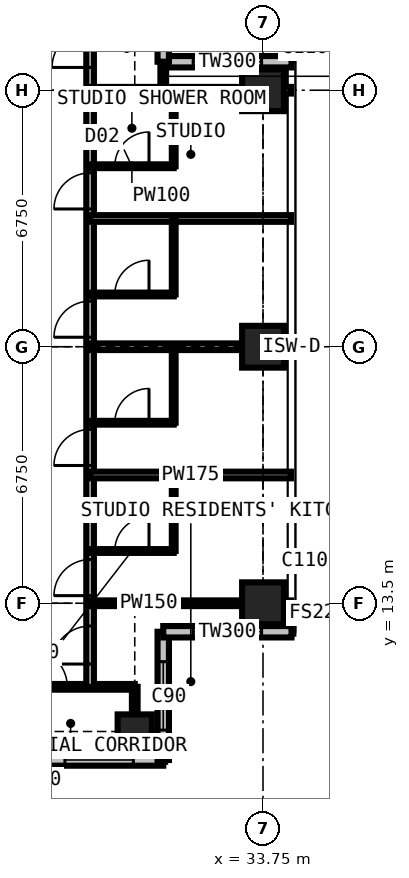
"""IFC4 building model, lengths in metres.
Left out: names, types, materials, properties, quantities, classifications, styles, units other than length and angle.
Written with IfcOpenShell. Run it as: python <this file> out.ifc"""

import sys

from ifc_helpers import new_model, si_unit, direction, frame, frame_2d, origin, origin_2d, place, context, subcontext, project, spatial, rectangle, extrude, element, fill, save


model = new_model("IFC4")
c1 = context("Model", 3, precision=1e-05, world=origin(), true_north=direction((0.0, 1.0)))
c2 = subcontext(c1, "Body", "Model", "MODEL_VIEW")
j1 = project(units=[si_unit("LENGTHUNIT", "METRE"), si_unit("PLANEANGLEUNIT", "RADIAN")], contexts=[c1])
p1 = place(None, origin())
s1 = spatial("IfcSite", under=j1, at=p1, CompositionType="ELEMENT")
p2 = place(p1, origin())
s2 = spatial("IfcBuilding", under=s1, at=p2, CompositionType="ELEMENT")
p3 = place(p2, frame((0.0, 0.0, 218.7)))
s3 = spatial("IfcBuildingStorey", under=s2, at=p3, CompositionType="ELEMENT", Elevation=218.7)
p4 = place(p3, frame((30.375, 10.125, 0.0), z_axis=(0.0, 0.0, 1.0), x_axis=(1.0, 0.0, 0.0)))
e1 = element("IfcColumn", 1, at=p4, inside=s3, PredefinedType="COLUMN", context=c2, shape_type="SweptSolid", body=[
    extrude(rectangle(XDim=0.9, YDim=0.9, at=origin_2d()), origin(), (0.0, 0.0, 1.0), 3.6),
])
for number, where, z_axis, x_axis in (
    (2, (33.75, 13.5, 0.0), (0.0, 0.0, 1.0), (1.0, 0.0, 0.0)),
    (3, (33.75, 20.25, 0.0), (0.0, 0.0, 1.0), (1.0, 0.0, 0.0)),
    (4, (33.75, 27.0, 0.0), (0.0, 0.0, 1.0), (1.0, 0.0, 0.0)),
):
    element("IfcColumn", number, at=place(p3, frame(where, z_axis=z_axis, x_axis=x_axis)), inside=s3, PredefinedType="COLUMN", context=c2, shape_type="SweptSolid", body=[
        extrude(rectangle(XDim=1.1, YDim=1.1, at=origin_2d()), origin(), (0.0, 0.0, 1.0), 3.6),
    ])
p5 = place(p3, frame((34.5, 27.75, 0.0), z_axis=(0.0, 0.0, 1.0), x_axis=(-1.0, 0.0, 0.0)))
e5 = element("IfcWall", 5, at=p5, inside=s3, PredefinedType="SOLIDWALL", context=c2, shape_type="SweptSolid", body=[
    extrude(rectangle(XDim=3.375, YDim=0.3, at=frame_2d((1.688, 0.0))), origin(), (0.0, 0.0, 1.0), 3.375),
])
p6 = place(p5, frame((0.788, 0.0, 0.6)))
e6 = element("IfcOpeningElement", 6, at=p6, cuts=e5, PredefinedType="OPENING", context=c2, shape_type="SweptSolid", body=[
    extrude(rectangle(XDim=1.8, YDim=2.1, at=frame_2d((0.9, 1.05))), frame((0.0, 0.16, 0.0), z_axis=(0.0, -1.0, 0.0), x_axis=(1.0, 0.0, 0.0)), (0.0, 0.0, 1.0), 0.32),
])
p7 = place(p3, frame((31.125, 27.75, 0.0), z_axis=(0.0, 0.0, 1.0), x_axis=(0.0, 1.0, 0.0)))
e7 = element("IfcWall", 7, at=p7, inside=s3, PredefinedType="SOLIDWALL", context=c2, shape_type="SweptSolid", body=[
    extrude(rectangle(XDim=3.375, YDim=0.3, at=frame_2d((1.688, 0.0))), origin(), (0.0, 0.0, 1.0), 3.375),
])
p8 = place(p7, frame((1.663, 0.0, 0.9)))
e8 = element("IfcOpeningElement", 8, at=p8, cuts=e7, PredefinedType="OPENING", context=c2, shape_type="SweptSolid", body=[
    extrude(rectangle(XDim=1.5, YDim=1.8, at=frame_2d((0.75, 0.9))), frame((0.0, 0.16, 0.0), z_axis=(0.0, -1.0, 0.0), x_axis=(1.0, 0.0, 0.0)), (0.0, 0.0, 1.0), 0.32),
])
p9 = place(p3, frame((27.75, 9.375, 0.0), z_axis=(0.0, 0.0, 1.0), x_axis=(1.0, 0.0, 0.0)))
e9 = element("IfcWall", 9, at=p9, inside=s3, PredefinedType="SOLIDWALL", context=c2, shape_type="SweptSolid", body=[
    extrude(rectangle(XDim=3.375, YDim=0.3, at=frame_2d((1.688, 0.0))), origin(), (0.0, 0.0, 1.0), 3.375),
])
p10 = place(p9, frame((0.788, 0.0, 0.6)))
e10 = element("IfcOpeningElement", 10, at=p10, cuts=e9, PredefinedType="OPENING", context=c2, shape_type="SweptSolid", body=[
    extrude(rectangle(XDim=1.8, YDim=2.1, at=frame_2d((0.9, 1.05))), frame((0.0, 0.16, 0.0), z_axis=(0.0, -1.0, 0.0), x_axis=(1.0, 0.0, 0.0)), (0.0, 0.0, 1.0), 0.32),
])
p11 = place(p3, frame((31.125, 9.375, 0.0), z_axis=(0.0, 0.0, 1.0), x_axis=(0.0, 1.0, 0.0)))
e11 = element("IfcWall", 11, at=p11, inside=s3, PredefinedType="SOLIDWALL", context=c2, shape_type="SweptSolid", body=[
    extrude(rectangle(XDim=3.375, YDim=0.3, at=frame_2d((1.688, 0.0))), origin(), (0.0, 0.0, 1.0), 3.375),
])
p12 = place(p11, frame((0.788, 0.0, 0.6)))
e12 = element("IfcOpeningElement", 12, at=p12, cuts=e11, PredefinedType="OPENING", context=c2, shape_type="SweptSolid", body=[
    extrude(rectangle(XDim=1.8, YDim=2.1, at=frame_2d((0.9, 1.05))), frame((0.0, 0.16, 0.0), z_axis=(0.0, -1.0, 0.0), x_axis=(1.0, 0.0, 0.0)), (0.0, 0.0, 1.0), 0.32),
])
p13 = place(p3, frame((31.125, 12.75, 0.0), z_axis=(0.0, 0.0, 1.0), x_axis=(1.0, 0.0, 0.0)))
e13 = element("IfcWall", 13, at=p13, inside=s3, PredefinedType="SOLIDWALL", context=c2, shape_type="SweptSolid", body=[
    extrude(rectangle(XDim=3.375, YDim=0.3, at=frame_2d((1.688, 0.0))), origin(), (0.0, 0.0, 1.0), 3.375),
])
p14 = place(p13, frame((0.788, 0.0, 0.6)))
e14 = element("IfcOpeningElement", 14, at=p14, cuts=e13, PredefinedType="OPENING", context=c2, shape_type="SweptSolid", body=[
    extrude(rectangle(XDim=1.8, YDim=2.1, at=frame_2d((0.9, 1.05))), frame((0.0, 0.16, 0.0), z_axis=(0.0, -1.0, 0.0), x_axis=(1.0, 0.0, 0.0)), (0.0, 0.0, 1.0), 0.32),
])
p15 = place(p3, frame((10.125, 11.3, 0.0), z_axis=(0.0, 0.0, 1.0), x_axis=(1.0, 0.0, 0.0)))
e15 = element("IfcWall", 15, at=p15, inside=s3, PredefinedType="PARTITIONING", context=c2, shape_type="SweptSolid", body=[
    extrude(rectangle(XDim=20.25, YDim=0.15, at=frame_2d((10.125, 0.0))), origin(), (0.0, 0.0, 1.0), 3.375),
])
p16 = place(p15, frame((6.95, 0.0, 0.0)))
e16 = element("IfcOpeningElement", 16, at=p16, cuts=e15, PredefinedType="OPENING", context=c2, shape_type="SweptSolid", body=[
    extrude(rectangle(XDim=0.95, YDim=2.2, at=frame_2d((0.475, 1.1))), frame((0.0, 0.085, 0.0), z_axis=(0.0, -1.0, 0.0), x_axis=(1.0, 0.0, 0.0)), (0.0, 0.0, 1.0), 0.17),
])
p17 = place(p15, frame((10.375, 0.0, 0.0)))
e17 = element("IfcOpeningElement", 17, at=p17, cuts=e15, PredefinedType="OPENING", context=c2, shape_type="SweptSolid", body=[
    extrude(rectangle(XDim=0.95, YDim=2.2, at=frame_2d((0.475, 1.1))), frame((0.0, 0.085, 0.0), z_axis=(0.0, -1.0, 0.0), x_axis=(1.0, 0.0, 0.0)), (0.0, 0.0, 1.0), 0.17),
])
p18 = place(p15, frame((13.75, 0.0, 0.0)))
e18 = element("IfcOpeningElement", 18, at=p18, cuts=e15, PredefinedType="OPENING", context=c2, shape_type="SweptSolid", body=[
    extrude(rectangle(XDim=0.95, YDim=2.2, at=frame_2d((0.475, 1.1))), frame((0.0, 0.085, 0.0), z_axis=(0.0, -1.0, 0.0), x_axis=(1.0, 0.0, 0.0)), (0.0, 0.0, 1.0), 0.17),
])
p19 = place(p15, frame((17.475, 0.0, 0.0)))
e19 = element("IfcOpeningElement", 19, at=p19, cuts=e15, PredefinedType="OPENING", context=c2, shape_type="SweptSolid", body=[
    extrude(rectangle(XDim=1.0, YDim=2.2, at=frame_2d((0.5, 1.1))), frame((0.0, 0.085, 0.0), z_axis=(0.0, -1.0, 0.0), x_axis=(1.0, 0.0, 0.0)), (0.0, 0.0, 1.0), 0.17),
])
p20 = place(p3, frame((29.2, 11.3, 0.0), z_axis=(0.0, 0.0, 1.0), x_axis=(0.0, 1.0, 0.0)))
e20 = element("IfcWall", 20, at=p20, inside=s3, PredefinedType="PARTITIONING", context=c2, shape_type="SweptSolid", body=[
    extrude(rectangle(XDim=17.9, YDim=0.2, at=frame_2d((8.95, 0.0))), origin(), (0.0, 0.0, 1.0), 3.375),
])
p21 = place(p20, frame((0.6, 0.0, 0.0)))
e21 = element("IfcOpeningElement", 21, at=p21, cuts=e20, PredefinedType="OPENING", context=c2, shape_type="SweptSolid", body=[
    extrude(rectangle(XDim=1.0, YDim=2.2, at=frame_2d((0.5, 1.1))), frame((0.0, 0.11, 0.0), z_axis=(0.0, -1.0, 0.0), x_axis=(1.0, 0.0, 0.0)), (0.0, 0.0, 1.0), 0.22),
])
p22 = place(p20, frame((2.4, 0.0, 0.0)))
e22 = element("IfcOpeningElement", 22, at=p22, cuts=e20, PredefinedType="OPENING", context=c2, shape_type="SweptSolid", body=[
    extrude(rectangle(XDim=0.95, YDim=2.2, at=frame_2d((0.475, 1.1))), frame((0.0, 0.11, 0.0), z_axis=(0.0, -1.0, 0.0), x_axis=(1.0, 0.0, 0.0)), (0.0, 0.0, 1.0), 0.22),
])
p23 = place(p20, frame((5.825, 0.0, 0.0)))
e23 = element("IfcOpeningElement", 23, at=p23, cuts=e20, PredefinedType="OPENING", context=c2, shape_type="SweptSolid", body=[
    extrude(rectangle(XDim=0.95, YDim=2.2, at=frame_2d((0.475, 1.1))), frame((0.0, 0.11, 0.0), z_axis=(0.0, -1.0, 0.0), x_axis=(1.0, 0.0, 0.0)), (0.0, 0.0, 1.0), 0.22),
])
p24 = place(p20, frame((9.2, 0.0, 0.0)))
e24 = element("IfcOpeningElement", 24, at=p24, cuts=e20, PredefinedType="OPENING", context=c2, shape_type="SweptSolid", body=[
    extrude(rectangle(XDim=0.95, YDim=2.2, at=frame_2d((0.475, 1.1))), frame((0.0, 0.11, 0.0), z_axis=(0.0, -1.0, 0.0), x_axis=(1.0, 0.0, 0.0)), (0.0, 0.0, 1.0), 0.22),
])
p25 = place(p20, frame((12.575, 0.0, 0.0)))
e25 = element("IfcOpeningElement", 25, at=p25, cuts=e20, PredefinedType="OPENING", context=c2, shape_type="SweptSolid", body=[
    extrude(rectangle(XDim=0.95, YDim=2.2, at=frame_2d((0.475, 1.1))), frame((0.0, 0.11, 0.0), z_axis=(0.0, -1.0, 0.0), x_axis=(1.0, 0.0, 0.0)), (0.0, 0.0, 1.0), 0.22),
])
p26 = place(p20, frame((16.3, 0.0, 0.0)))
e26 = element("IfcOpeningElement", 26, at=p26, cuts=e20, PredefinedType="OPENING", context=c2, shape_type="SweptSolid", body=[
    extrude(rectangle(XDim=1.0, YDim=2.2, at=frame_2d((0.5, 1.1))), frame((0.0, 0.11, 0.0), z_axis=(0.0, -1.0, 0.0), x_axis=(1.0, 0.0, 0.0)), (0.0, 0.0, 1.0), 0.22),
])
p27 = place(p3, frame((29.2, 13.5, 0.0), z_axis=(0.0, 0.0, 1.0), x_axis=(1.0, 0.0, 0.0)))
e27 = element("IfcWall", 27, at=p27, inside=s3, PredefinedType="PARTITIONING", context=c2, shape_type="SweptSolid", body=[
    extrude(rectangle(XDim=5.284, YDim=0.15, at=frame_2d((2.642, 0.0))), origin(), (0.0, 0.0, 1.0), 2.877),
])
p28 = place(p3, frame((29.2, 14.875, 0.0), z_axis=(0.0, 0.0, 1.0), x_axis=(1.0, 0.0, 0.0)))
e28 = element("IfcWall", 28, at=p28, inside=s3, PredefinedType="PARTITIONING", context=c2, shape_type="SweptSolid", body=[
    extrude(rectangle(XDim=2.2, YDim=0.1, at=frame_2d((1.1, 0.0))), origin(), (0.0, 0.0, 1.0), 3.375),
])
p29 = place(p28, frame((0.65, 0.0, 0.0)))
e29 = element("IfcOpeningElement", 29, at=p29, cuts=e28, PredefinedType="OPENING", context=c2, shape_type="SweptSolid", body=[
    extrude(rectangle(XDim=0.9, YDim=2.2, at=frame_2d((0.45, 1.1))), frame((0.0, 0.06, 0.0), z_axis=(0.0, -1.0, 0.0), x_axis=(1.0, 0.0, 0.0)), (0.0, 0.0, 1.0), 0.12),
])
p30 = place(p3, frame((29.2, 16.875, 0.0), z_axis=(0.0, 0.0, 1.0), x_axis=(1.0, 0.0, 0.0)))
e30 = element("IfcWall", 30, at=p30, inside=s3, PredefinedType="PARTITIONING", context=c2, shape_type="SweptSolid", body=[
    extrude(rectangle(XDim=5.284, YDim=0.175, at=frame_2d((2.642, 0.0))), origin(), (0.0, 0.0, 1.0), 3.375),
])
p31 = place(p3, frame((29.2, 18.25, 0.0), z_axis=(0.0, 0.0, 1.0), x_axis=(1.0, 0.0, 0.0)))
e31 = element("IfcWall", 31, at=p31, inside=s3, PredefinedType="PARTITIONING", context=c2, shape_type="SweptSolid", body=[
    extrude(rectangle(XDim=2.2, YDim=0.1, at=frame_2d((1.1, 0.0))), origin(), (0.0, 0.0, 1.0), 3.375),
])
p32 = place(p31, frame((0.65, 0.0, 0.0)))
e32 = element("IfcOpeningElement", 32, at=p32, cuts=e31, PredefinedType="OPENING", context=c2, shape_type="SweptSolid", body=[
    extrude(rectangle(XDim=0.9, YDim=2.2, at=frame_2d((0.45, 1.1))), frame((0.0, 0.06, 0.0), z_axis=(0.0, -1.0, 0.0), x_axis=(1.0, 0.0, 0.0)), (0.0, 0.0, 1.0), 0.12),
])
p33 = place(p3, frame((29.2, 20.25, 0.0), z_axis=(0.0, 0.0, 1.0), x_axis=(1.0, 0.0, 0.0)))
e33 = element("IfcWall", 33, at=p33, inside=s3, PredefinedType="PARTITIONING", context=c2, shape_type="SweptSolid", body=[
    extrude(rectangle(XDim=5.284, YDim=0.175, at=frame_2d((2.642, 0.0))), origin(), (0.0, 0.0, 1.0), 2.877),
])
p34 = place(p3, frame((29.2, 21.625, 0.0), z_axis=(0.0, 0.0, 1.0), x_axis=(1.0, 0.0, 0.0)))
e34 = element("IfcWall", 34, at=p34, inside=s3, PredefinedType="PARTITIONING", context=c2, shape_type="SweptSolid", body=[
    extrude(rectangle(XDim=2.2, YDim=0.1, at=frame_2d((1.1, 0.0))), origin(), (0.0, 0.0, 1.0), 3.375),
])
p35 = place(p34, frame((0.65, 0.0, 0.0)))
e35 = element("IfcOpeningElement", 35, at=p35, cuts=e34, PredefinedType="OPENING", context=c2, shape_type="SweptSolid", body=[
    extrude(rectangle(XDim=0.9, YDim=2.2, at=frame_2d((0.45, 1.1))), frame((0.0, 0.06, 0.0), z_axis=(0.0, -1.0, 0.0), x_axis=(1.0, 0.0, 0.0)), (0.0, 0.0, 1.0), 0.12),
])
p36 = place(p3, frame((29.2, 23.625, 0.0), z_axis=(0.0, 0.0, 1.0), x_axis=(1.0, 0.0, 0.0)))
e36 = element("IfcWall", 36, at=p36, inside=s3, PredefinedType="PARTITIONING", context=c2, shape_type="SweptSolid", body=[
    extrude(rectangle(XDim=5.284, YDim=0.175, at=frame_2d((2.642, 0.0))), origin(), (0.0, 0.0, 1.0), 3.375),
])
p37 = place(p3, frame((29.2, 25.0, 0.0), z_axis=(0.0, 0.0, 1.0), x_axis=(1.0, 0.0, 0.0)))
e37 = element("IfcWall", 37, at=p37, inside=s3, PredefinedType="PARTITIONING", context=c2, shape_type="SweptSolid", body=[
    extrude(rectangle(XDim=2.2, YDim=0.1, at=frame_2d((1.1, 0.0))), origin(), (0.0, 0.0, 1.0), 3.375),
])
p38 = place(p37, frame((0.65, 0.0, 0.0)))
e38 = element("IfcOpeningElement", 38, at=p38, cuts=e37, PredefinedType="OPENING", context=c2, shape_type="SweptSolid", body=[
    extrude(rectangle(XDim=0.9, YDim=2.2, at=frame_2d((0.45, 1.1))), frame((0.0, 0.06, 0.0), z_axis=(0.0, -1.0, 0.0), x_axis=(1.0, 0.0, 0.0)), (0.0, 0.0, 1.0), 0.12),
])
p39 = place(p3, frame((29.2, 27.0, 0.0), z_axis=(0.0, 0.0, 1.0), x_axis=(1.0, 0.0, 0.0)))
e39 = element("IfcWall", 39, at=p39, inside=s3, PredefinedType="PARTITIONING", context=c2, shape_type="SweptSolid", body=[
    extrude(rectangle(XDim=5.284, YDim=0.175, at=frame_2d((2.642, 0.0))), origin(), (0.0, 0.0, 1.0), 2.877),
])
p40 = place(p3, frame((30.375, 9.525, 0.0), z_axis=(0.0, 0.0, 1.0), x_axis=(0.0, 1.0, 0.0)))
e40 = element("IfcWall", 40, at=p40, inside=s3, PredefinedType="PARTITIONING", context=c2, shape_type="SweptSolid", body=[
    extrude(rectangle(XDim=1.775, YDim=0.15, at=frame_2d((0.888, 0.0))), origin(), (0.0, 0.0, 1.0), 2.877),
])
p41 = place(p3, frame((31.125, 27.0, 0.0), z_axis=(0.0, 0.0, 1.0), x_axis=(0.0, 1.0, 0.0)))
e41 = element("IfcWall", 41, at=p41, inside=s3, PredefinedType="PARTITIONING", context=c2, shape_type="SweptSolid", body=[
    extrude(rectangle(XDim=0.734, YDim=0.15, at=frame_2d((0.367, 0.0))), origin(), (0.0, 0.0, 1.0), 3.375),
])
for number, where, z_axis, x_axis in (
    (42, (31.4, 14.875, 0.0), (0.0, 0.0, 1.0), (0.0, 1.0, 0.0)),
    (43, (31.4, 18.25, 0.0), (0.0, 0.0, 1.0), (0.0, 1.0, 0.0)),
    (44, (31.4, 21.625, 0.0), (0.0, 0.0, 1.0), (0.0, 1.0, 0.0)),
    (45, (31.4, 25.0, 0.0), (0.0, 0.0, 1.0), (0.0, 1.0, 0.0)),
):
    element("IfcWall", number, at=place(p3, frame(where, z_axis=z_axis, x_axis=x_axis)), inside=s3, PredefinedType="PARTITIONING", context=c2, shape_type="SweptSolid", body=[
        extrude(rectangle(XDim=2.0, YDim=0.1, at=frame_2d((1.0, 0.0))), origin(), (0.0, 0.0, 1.0), 3.375),
    ])
p42 = place(p6, origin())
e46 = element("IfcWindow", 46, at=p42, inside=s3, PartitioningType="SINGLE_PANEL", PredefinedType="WINDOW", context=c2, shape_type="SweptSolid", body=[
    extrude(rectangle(XDim=1.8, YDim=2.1, at=frame_2d((0.9, 1.05))), frame((0.0, 0.03, 0.0), z_axis=(0.0, -1.0, 0.0), x_axis=(1.0, 0.0, 0.0)), (0.0, 0.0, 1.0), 0.06),
])
fill(e6, e46)
p43 = place(p10, origin())
e47 = element("IfcWindow", 47, at=p43, inside=s3, PartitioningType="SINGLE_PANEL", PredefinedType="WINDOW", context=c2, shape_type="SweptSolid", body=[
    extrude(rectangle(XDim=1.8, YDim=2.1, at=frame_2d((0.9, 1.05))), frame((0.0, 0.03, 0.0), z_axis=(0.0, -1.0, 0.0), x_axis=(1.0, 0.0, 0.0)), (0.0, 0.0, 1.0), 0.06),
])
fill(e10, e47)
p44 = place(p12, origin())
e48 = element("IfcWindow", 48, at=p44, inside=s3, PartitioningType="SINGLE_PANEL", PredefinedType="WINDOW", context=c2, shape_type="SweptSolid", body=[
    extrude(rectangle(XDim=1.8, YDim=2.1, at=frame_2d((0.9, 1.05))), frame((0.0, 0.03, 0.0), z_axis=(0.0, -1.0, 0.0), x_axis=(1.0, 0.0, 0.0)), (0.0, 0.0, 1.0), 0.06),
])
fill(e12, e48)
p45 = place(p14, origin())
e49 = element("IfcWindow", 49, at=p45, inside=s3, PartitioningType="SINGLE_PANEL", PredefinedType="WINDOW", context=c2, shape_type="SweptSolid", body=[
    extrude(rectangle(XDim=1.8, YDim=2.1, at=frame_2d((0.9, 1.05))), frame((0.0, 0.03, 0.0), z_axis=(0.0, -1.0, 0.0), x_axis=(1.0, 0.0, 0.0)), (0.0, 0.0, 1.0), 0.06),
])
fill(e14, e49)
p46 = place(p19, origin())
e50 = element("IfcDoor", 50, at=p46, inside=s3, OperationType="SINGLE_SWING_LEFT", PredefinedType="DOOR", context=c2, shape_type="SweptSolid", body=[
    extrude(rectangle(XDim=1.0, YDim=2.2, at=frame_2d((0.5, 1.1))), frame((0.0, 0.025, 0.0), z_axis=(0.0, -1.0, 0.0), x_axis=(1.0, 0.0, 0.0)), (0.0, 0.0, 1.0), 0.05),
])
fill(e19, e50)
p47 = place(p21, origin())
e51 = element("IfcDoor", 51, at=p47, inside=s3, OperationType="SINGLE_SWING_LEFT", PredefinedType="DOOR", context=c2, shape_type="SweptSolid", body=[
    extrude(rectangle(XDim=1.0, YDim=2.2, at=frame_2d((0.5, 1.1))), frame((0.0, 0.025, 0.0), z_axis=(0.0, -1.0, 0.0), x_axis=(1.0, 0.0, 0.0)), (0.0, 0.0, 1.0), 0.05),
])
fill(e21, e51)
p48 = place(p22, origin())
e52 = element("IfcDoor", 52, at=p48, inside=s3, OperationType="SINGLE_SWING_LEFT", PredefinedType="DOOR", context=c2, shape_type="SweptSolid", body=[
    extrude(rectangle(XDim=0.95, YDim=2.2, at=frame_2d((0.475, 1.1))), frame((0.0, 0.025, 0.0), z_axis=(0.0, -1.0, 0.0), x_axis=(1.0, 0.0, 0.0)), (0.0, 0.0, 1.0), 0.05),
])
fill(e22, e52)
p49 = place(p29, origin())
e53 = element("IfcDoor", 53, at=p49, inside=s3, OperationType="SINGLE_SWING_RIGHT", PredefinedType="DOOR", context=c2, shape_type="SweptSolid", body=[
    extrude(rectangle(XDim=0.9, YDim=2.2, at=frame_2d((0.45, 1.1))), frame((0.0, 0.025, 0.0), z_axis=(0.0, -1.0, 0.0), x_axis=(1.0, 0.0, 0.0)), (0.0, 0.0, 1.0), 0.05),
])
fill(e29, e53)
p50 = place(p23, origin())
e54 = element("IfcDoor", 54, at=p50, inside=s3, OperationType="SINGLE_SWING_LEFT", PredefinedType="DOOR", context=c2, shape_type="SweptSolid", body=[
    extrude(rectangle(XDim=0.95, YDim=2.2, at=frame_2d((0.475, 1.1))), frame((0.0, 0.025, 0.0), z_axis=(0.0, -1.0, 0.0), x_axis=(1.0, 0.0, 0.0)), (0.0, 0.0, 1.0), 0.05),
])
fill(e23, e54)
p51 = place(p32, origin())
e55 = element("IfcDoor", 55, at=p51, inside=s3, OperationType="SINGLE_SWING_RIGHT", PredefinedType="DOOR", context=c2, shape_type="SweptSolid", body=[
    extrude(rectangle(XDim=0.9, YDim=2.2, at=frame_2d((0.45, 1.1))), frame((0.0, 0.025, 0.0), z_axis=(0.0, -1.0, 0.0), x_axis=(1.0, 0.0, 0.0)), (0.0, 0.0, 1.0), 0.05),
])
fill(e32, e55)
p52 = place(p24, origin())
e56 = element("IfcDoor", 56, at=p52, inside=s3, OperationType="SINGLE_SWING_LEFT", PredefinedType="DOOR", context=c2, shape_type="SweptSolid", body=[
    extrude(rectangle(XDim=0.95, YDim=2.2, at=frame_2d((0.475, 1.1))), frame((0.0, 0.025, 0.0), z_axis=(0.0, -1.0, 0.0), x_axis=(1.0, 0.0, 0.0)), (0.0, 0.0, 1.0), 0.05),
])
fill(e24, e56)
p53 = place(p35, origin())
e57 = element("IfcDoor", 57, at=p53, inside=s3, OperationType="SINGLE_SWING_RIGHT", PredefinedType="DOOR", context=c2, shape_type="SweptSolid", body=[
    extrude(rectangle(XDim=0.9, YDim=2.2, at=frame_2d((0.45, 1.1))), frame((0.0, 0.025, 0.0), z_axis=(0.0, -1.0, 0.0), x_axis=(1.0, 0.0, 0.0)), (0.0, 0.0, 1.0), 0.05),
])
fill(e35, e57)
p54 = place(p25, origin())
e58 = element("IfcDoor", 58, at=p54, inside=s3, OperationType="SINGLE_SWING_LEFT", PredefinedType="DOOR", context=c2, shape_type="SweptSolid", body=[
    extrude(rectangle(XDim=0.95, YDim=2.2, at=frame_2d((0.475, 1.1))), frame((0.0, 0.025, 0.0), z_axis=(0.0, -1.0, 0.0), x_axis=(1.0, 0.0, 0.0)), (0.0, 0.0, 1.0), 0.05),
])
fill(e25, e58)
p55 = place(p38, origin())
e59 = element("IfcDoor", 59, at=p55, inside=s3, OperationType="SINGLE_SWING_RIGHT", PredefinedType="DOOR", context=c2, shape_type="SweptSolid", body=[
    extrude(rectangle(XDim=0.9, YDim=2.2, at=frame_2d((0.45, 1.1))), frame((0.0, 0.025, 0.0), z_axis=(0.0, -1.0, 0.0), x_axis=(1.0, 0.0, 0.0)), (0.0, 0.0, 1.0), 0.05),
])
fill(e38, e59)
p56 = place(p26, origin())
e60 = element("IfcDoor", 60, at=p56, inside=s3, OperationType="SINGLE_SWING_LEFT", PredefinedType="DOOR", context=c2, shape_type="SweptSolid", body=[
    extrude(rectangle(XDim=1.0, YDim=2.2, at=frame_2d((0.5, 1.1))), frame((0.0, 0.025, 0.0), z_axis=(0.0, -1.0, 0.0), x_axis=(1.0, 0.0, 0.0)), (0.0, 0.0, 1.0), 0.05),
])
fill(e26, e60)
save(model, sys.argv[1])
